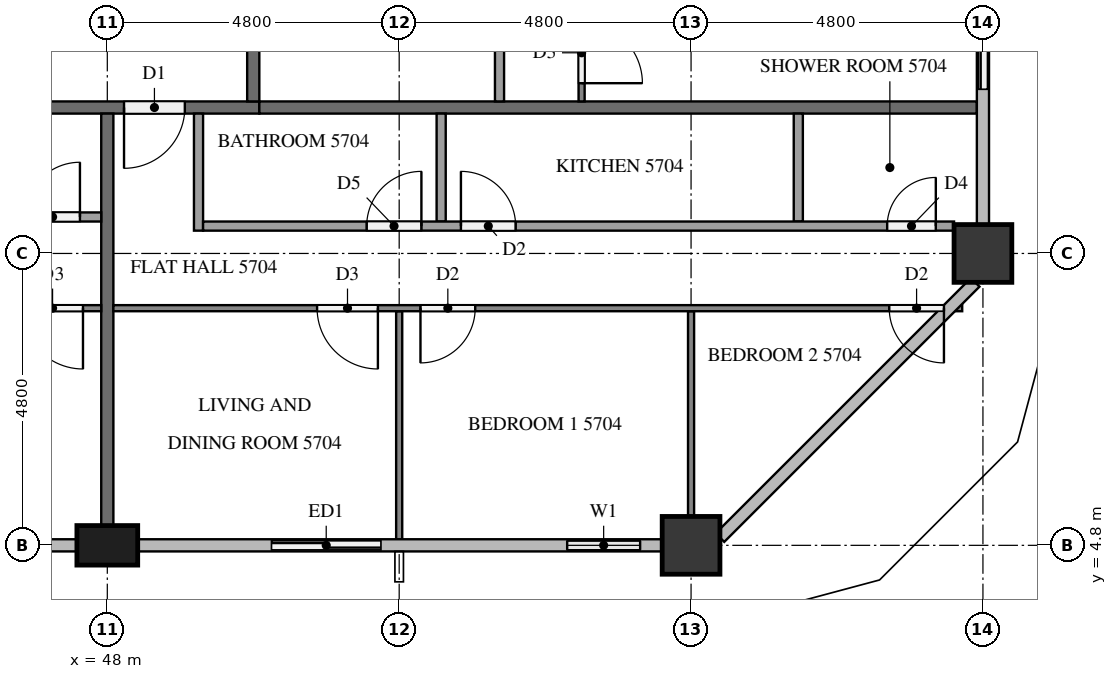
"""IFC4 building model, lengths in metres.
Left out: names, types, materials, properties, quantities, classifications, styles, units other than length and angle.
Written with IfcOpenShell. Run it as: python <this file> out.ifc"""

import sys

from ifc_helpers import new_model, si_unit, direction, frame, frame_2d, origin, origin_2d, place, context, subcontext, project, spatial, rectangle, extrude, element, fill, save


model = new_model("IFC4")
c1 = context("Model", 3, precision=1e-05, world=origin(), true_north=direction((0.0, 1.0)))
c2 = subcontext(c1, "Body", "Model", "MODEL_VIEW")
j1 = project(units=[si_unit("LENGTHUNIT", "METRE"), si_unit("PLANEANGLEUNIT", "RADIAN")], contexts=[c1])
p1 = place(None, origin())
s1 = spatial("IfcSite", under=j1, at=p1, CompositionType="ELEMENT")
p2 = place(p1, origin())
s2 = spatial("IfcBuilding", under=s1, at=p2, CompositionType="ELEMENT")
p3 = place(p2, frame((0.0, 0.0, 219.3)))
s3 = spatial("IfcBuildingStorey", under=s2, at=p3, CompositionType="ELEMENT", Elevation=219.3)
p4 = place(p3, frame((48.0, 4.8, 0.0), z_axis=(0.0, 0.0, 1.0), x_axis=(1.0, 0.0, 0.0)))
e1 = element("IfcColumn", 1, at=p4, inside=s3, PredefinedType="COLUMN", context=c2, shape_type="SweptSolid", body=[
    extrude(rectangle(XDim=1.0, YDim=0.65, at=origin_2d()), origin(), (0.0, 0.0, 1.0), 3.2),
])
for number, where, z_axis, x_axis in (
    (2, (57.6, 4.8, 0.0), (0.0, 0.0, 1.0), (1.0, 0.0, 0.0)),
    (3, (62.4, 9.6, 0.0), (0.0, 0.0, 1.0), (1.0, 0.0, 0.0)),
):
    element("IfcColumn", number, at=place(p3, frame(where, z_axis=z_axis, x_axis=x_axis)), inside=s3, PredefinedType="COLUMN", context=c2, shape_type="SweptSolid", body=[
        extrude(rectangle(XDim=0.95, YDim=0.95, at=origin_2d()), origin(), (0.0, 0.0, 1.0), 3.2),
    ])
p5 = place(p3, frame((50.4, 4.8, 0.0), z_axis=(0.0, 0.0, 1.0), x_axis=(1.0, 0.0, 0.0)))
e4 = element("IfcWall", 4, at=p5, inside=s3, PredefinedType="SOLIDWALL", context=c2, shape_type="SweptSolid", body=[
    extrude(rectangle(XDim=2.4, YDim=0.15, at=frame_2d((1.2, 0.0))), origin(), (0.0, 0.0, 1.0), 3.2),
])
p6 = place(p5, frame((0.3, 0.0, 0.0)))
e5 = element("IfcOpeningElement", 5, at=p6, cuts=e4, PredefinedType="OPENING", context=c2, shape_type="SweptSolid", body=[
    extrude(rectangle(XDim=1.8, YDim=2.4, at=frame_2d((0.9, 1.2))), frame((0.0, 0.085, 0.0), z_axis=(0.0, -1.0, 0.0), x_axis=(1.0, 0.0, 0.0)), (0.0, 0.0, 1.0), 0.17),
])
p7 = place(p3, frame((55.2, 4.8, 0.0), z_axis=(0.0, 0.0, 1.0), x_axis=(1.0, 0.0, 0.0)))
e6 = element("IfcWall", 6, at=p7, inside=s3, PredefinedType="SOLIDWALL", context=c2, shape_type="SweptSolid", body=[
    extrude(rectangle(XDim=1.925, YDim=0.15, at=frame_2d((0.962, 0.0))), origin(), (0.0, 0.0, 1.0), 3.2),
])
p8 = place(p7, frame((0.363, 0.0, 0.9)))
e7 = element("IfcOpeningElement", 7, at=p8, cuts=e6, PredefinedType="OPENING", context=c2, shape_type="SweptSolid", body=[
    extrude(rectangle(XDim=1.2, YDim=1.4, at=frame_2d((0.6, 0.7))), frame((0.0, 0.085, 0.0), z_axis=(0.0, -1.0, 0.0), x_axis=(1.0, 0.0, 0.0)), (0.0, 0.0, 1.0), 0.17),
])
p9 = place(p3, frame((62.4, 12.0, 0.0), z_axis=(0.0, 0.0, 1.0), x_axis=(0.0, 1.0, 0.0)))
e8 = element("IfcWall", 8, at=p9, inside=s3, PredefinedType="SOLIDWALL", context=c2, shape_type="SweptSolid", body=[
    extrude(rectangle(XDim=2.4, YDim=0.15, at=frame_2d((1.2, 0.0))), origin(), (0.0, 0.0, 1.0), 3.2),
])
p10 = place(p9, frame((0.3, 0.0, 0.0)))
e9 = element("IfcOpeningElement", 9, at=p10, cuts=e8, PredefinedType="OPENING", context=c2, shape_type="SweptSolid", body=[
    extrude(rectangle(XDim=1.8, YDim=2.4, at=frame_2d((0.9, 1.2))), frame((0.0, 0.085, 0.0), z_axis=(0.0, -1.0, 0.0), x_axis=(1.0, 0.0, 0.0)), (0.0, 0.0, 1.0), 0.17),
])
p11 = place(p3, frame((50.5, 12.0, 0.0), z_axis=(0.0, 0.0, 1.0), x_axis=(-1.0, 0.0, 0.0)))
e10 = element("IfcWall", 10, at=p11, inside=s3, PredefinedType="PARTITIONING", context=c2, shape_type="SweptSolid", body=[
    extrude(rectangle(XDim=38.6, YDim=0.2, at=frame_2d((19.3, 0.0))), origin(), (0.0, 0.0, 1.0), 3.2),
])
p12 = place(p11, frame((36.375, 0.0, 0.0)))
e11 = element("IfcOpeningElement", 11, at=p12, cuts=e10, PredefinedType="OPENING", context=c2, shape_type="SweptSolid", body=[
    extrude(rectangle(XDim=1.0, YDim=2.1, at=frame_2d((0.5, 1.05))), frame((0.0, 0.11, 0.0), z_axis=(0.0, -1.0, 0.0), x_axis=(1.0, 0.0, 0.0)), (0.0, 0.0, 1.0), 0.22),
])
p13 = place(p11, frame((34.825, 0.0, 0.0)))
e12 = element("IfcOpeningElement", 12, at=p13, cuts=e10, PredefinedType="OPENING", context=c2, shape_type="SweptSolid", body=[
    extrude(rectangle(XDim=1.0, YDim=2.1, at=frame_2d((0.5, 1.05))), frame((0.0, 0.11, 0.0), z_axis=(0.0, -1.0, 0.0), x_axis=(1.0, 0.0, 0.0)), (0.0, 0.0, 1.0), 0.22),
])
p14 = place(p11, frame((20.375, 0.0, 0.0)))
e13 = element("IfcOpeningElement", 13, at=p14, cuts=e10, PredefinedType="OPENING", context=c2, shape_type="SweptSolid", body=[
    extrude(rectangle(XDim=1.1, YDim=2.1, at=frame_2d((0.55, 1.05))), frame((0.0, 0.11, 0.0), z_axis=(0.0, -1.0, 0.0), x_axis=(1.0, 0.0, 0.0)), (0.0, 0.0, 1.0), 0.22),
])
p15 = place(p11, frame((1.225, 0.0, 0.0)))
e14 = element("IfcOpeningElement", 14, at=p15, cuts=e10, PredefinedType="OPENING", context=c2, shape_type="SweptSolid", body=[
    extrude(rectangle(XDim=1.0, YDim=2.1, at=frame_2d((0.5, 1.05))), frame((0.0, 0.11, 0.0), z_axis=(0.0, -1.0, 0.0), x_axis=(1.0, 0.0, 0.0)), (0.0, 0.0, 1.0), 0.22),
])
p16 = place(p3, frame((50.4, 40.7, 0.0), z_axis=(0.0, 0.0, 1.0), x_axis=(0.0, -1.0, 0.0)))
e15 = element("IfcWall", 15, at=p16, inside=s3, PredefinedType="PARTITIONING", context=c2, shape_type="SweptSolid", body=[
    extrude(rectangle(XDim=28.6, YDim=0.2, at=frame_2d((14.3, 0.0))), origin(), (0.0, 0.0, 1.0), 3.2),
])
p17 = place(p16, frame((21.775, 0.0, 0.0)))
e16 = element("IfcOpeningElement", 16, at=p17, cuts=e15, PredefinedType="OPENING", context=c2, shape_type="SweptSolid", body=[
    extrude(rectangle(XDim=1.0, YDim=2.1, at=frame_2d((0.5, 1.05))), frame((0.0, 0.11, 0.0), z_axis=(0.0, -1.0, 0.0), x_axis=(1.0, 0.0, 0.0)), (0.0, 0.0, 1.0), 0.22),
])
p18 = place(p16, frame((7.375, 0.0, 0.0)))
e17 = element("IfcOpeningElement", 17, at=p18, cuts=e15, PredefinedType="OPENING", context=c2, shape_type="SweptSolid", body=[
    extrude(rectangle(XDim=1.0, YDim=2.1, at=frame_2d((0.5, 1.05))), frame((0.0, 0.11, 0.0), z_axis=(0.0, -1.0, 0.0), x_axis=(1.0, 0.0, 0.0)), (0.0, 0.0, 1.0), 0.22),
])
p19 = place(p16, frame((0.175, 0.0, 0.0)))
e18 = element("IfcOpeningElement", 18, at=p19, cuts=e15, PredefinedType="OPENING", context=c2, shape_type="SweptSolid", body=[
    extrude(rectangle(XDim=1.0, YDim=2.1, at=frame_2d((0.5, 1.05))), frame((0.0, 0.11, 0.0), z_axis=(0.0, -1.0, 0.0), x_axis=(1.0, 0.0, 0.0)), (0.0, 0.0, 1.0), 0.22),
])
p20 = place(p3, frame((48.0, 11.9, 0.0), z_axis=(0.0, 0.0, 1.0), x_axis=(0.0, -1.0, 0.0)))
e19 = element("IfcWall", 19, at=p20, inside=s3, PredefinedType="PARTITIONING", context=c2, shape_type="SweptSolid", body=[
    extrude(rectangle(XDim=6.775, YDim=0.2, at=frame_2d((3.387, 0.0))), origin(), (0.0, 0.0, 1.0), 3.2),
])
p21 = place(p3, frame((50.5, 12.0, 0.0), z_axis=(0.0, 0.0, 1.0), x_axis=(1.0, 0.0, 0.0)))
e20 = element("IfcWall", 20, at=p21, inside=s3, PredefinedType="PARTITIONING", context=c2, shape_type="SweptSolid", body=[
    extrude(rectangle(XDim=11.8, YDim=0.2, at=frame_2d((5.9, 0.0))), origin(), (0.0, 0.0, 1.0), 3.2),
])
p22 = place(p3, frame((47.9, 8.7, 0.0), z_axis=(0.0, 0.0, 1.0), x_axis=(-1.0, 0.0, 0.0)))
e21 = element("IfcWall", 21, at=p22, inside=s3, PredefinedType="PARTITIONING", context=c2, shape_type="SweptSolid", body=[
    extrude(rectangle(XDim=19.0, YDim=0.1, at=frame_2d((9.5, 0.0))), origin(), (0.0, 0.0, 1.0), 3.2),
])
p23 = place(p22, frame((17.8, 0.0, 0.0)))
e22 = element("IfcOpeningElement", 22, at=p23, cuts=e21, PredefinedType="OPENING", context=c2, shape_type="SweptSolid", body=[
    extrude(rectangle(XDim=0.9, YDim=2.1, at=frame_2d((0.45, 1.05))), frame((0.0, 0.06, 0.0), z_axis=(0.0, -1.0, 0.0), x_axis=(1.0, 0.0, 0.0)), (0.0, 0.0, 1.0), 0.12),
])
p24 = place(p22, frame((9.85, 0.0, 0.0)))
e23 = element("IfcOpeningElement", 23, at=p24, cuts=e21, PredefinedType="OPENING", context=c2, shape_type="SweptSolid", body=[
    extrude(rectangle(XDim=0.9, YDim=2.1, at=frame_2d((0.45, 1.05))), frame((0.0, 0.06, 0.0), z_axis=(0.0, -1.0, 0.0), x_axis=(1.0, 0.0, 0.0)), (0.0, 0.0, 1.0), 0.12),
])
p25 = place(p22, frame((8.25, 0.0, 0.0)))
e24 = element("IfcOpeningElement", 24, at=p25, cuts=e21, PredefinedType="OPENING", context=c2, shape_type="SweptSolid", body=[
    extrude(rectangle(XDim=0.9, YDim=2.1, at=frame_2d((0.45, 1.05))), frame((0.0, 0.06, 0.0), z_axis=(0.0, -1.0, 0.0), x_axis=(1.0, 0.0, 0.0)), (0.0, 0.0, 1.0), 0.12),
])
p26 = place(p22, frame((0.3, 0.0, 0.0)))
e25 = element("IfcOpeningElement", 25, at=p26, cuts=e21, PredefinedType="OPENING", context=c2, shape_type="SweptSolid", body=[
    extrude(rectangle(XDim=1.0, YDim=2.1, at=frame_2d((0.5, 1.05))), frame((0.0, 0.06, 0.0), z_axis=(0.0, -1.0, 0.0), x_axis=(1.0, 0.0, 0.0)), (0.0, 0.0, 1.0), 0.12),
])
p27 = place(p3, frame((30.375, 10.2, 0.0), z_axis=(0.0, 0.0, 1.0), x_axis=(1.0, 0.0, 0.0)))
e26 = element("IfcWall", 26, at=p27, inside=s3, PredefinedType="PARTITIONING", context=c2, shape_type="SweptSolid", body=[
    extrude(rectangle(XDim=17.525, YDim=0.15, at=frame_2d((8.762, 0.0))), origin(), (0.0, 0.0, 1.0), 3.2),
])
p28 = place(p27, frame((0.3, 0.0, 0.0)))
e27 = element("IfcOpeningElement", 27, at=p28, cuts=e26, PredefinedType="OPENING", context=c2, shape_type="SweptSolid", body=[
    extrude(rectangle(XDim=0.9, YDim=2.1, at=frame_2d((0.45, 1.05))), frame((0.0, 0.085, 0.0), z_axis=(0.0, -1.0, 0.0), x_axis=(1.0, 0.0, 0.0)), (0.0, 0.0, 1.0), 0.17),
])
p29 = place(p27, frame((8.733, 0.0, 0.0)))
e28 = element("IfcOpeningElement", 28, at=p29, cuts=e26, PredefinedType="OPENING", context=c2, shape_type="SweptSolid", body=[
    extrude(rectangle(XDim=0.8, YDim=2.1, at=frame_2d((0.4, 1.05))), frame((0.0, 0.085, 0.0), z_axis=(0.0, -1.0, 0.0), x_axis=(1.0, 0.0, 0.0)), (0.0, 0.0, 1.0), 0.17),
])
p30 = place(p27, frame((10.183, 0.0, 0.0)))
e29 = element("IfcOpeningElement", 29, at=p30, cuts=e26, PredefinedType="OPENING", context=c2, shape_type="SweptSolid", body=[
    extrude(rectangle(XDim=0.8, YDim=2.1, at=frame_2d((0.4, 1.05))), frame((0.0, 0.085, 0.0), z_axis=(0.0, -1.0, 0.0), x_axis=(1.0, 0.0, 0.0)), (0.0, 0.0, 1.0), 0.17),
])
p31 = place(p27, frame((16.275, 0.0, 0.0)))
e30 = element("IfcOpeningElement", 30, at=p31, cuts=e26, PredefinedType="OPENING", context=c2, shape_type="SweptSolid", body=[
    extrude(rectangle(XDim=0.9, YDim=2.1, at=frame_2d((0.45, 1.05))), frame((0.0, 0.085, 0.0), z_axis=(0.0, -1.0, 0.0), x_axis=(1.0, 0.0, 0.0)), (0.0, 0.0, 1.0), 0.17),
])
p32 = place(p3, frame((52.8, 8.65, 0.0), z_axis=(0.0, 0.0, 1.0), x_axis=(0.0, -1.0, 0.0)))
e31 = element("IfcWall", 31, at=p32, inside=s3, PredefinedType="PARTITIONING", context=c2, shape_type="SweptSolid", body=[
    extrude(rectangle(XDim=3.75, YDim=0.1, at=frame_2d((1.875, 0.0))), origin(), (0.0, 0.0, 1.0), 3.2),
])
p33 = place(p3, frame((57.6, 8.65, 0.0), z_axis=(0.0, 0.0, 1.0), x_axis=(0.0, -1.0, 0.0)))
e32 = element("IfcWall", 32, at=p33, inside=s3, PredefinedType="PARTITIONING", context=c2, shape_type="SweptSolid", body=[
    extrude(rectangle(XDim=3.375, YDim=0.1, at=frame_2d((1.688, 0.0))), origin(), (0.0, 0.0, 1.0), 3.2),
])
p34 = place(p3, frame((62.059, 8.7, 0.0), z_axis=(0.0, 0.0, 1.0), x_axis=(-1.0, 0.0, 0.0)))
e33 = element("IfcWall", 33, at=p34, inside=s3, PredefinedType="PARTITIONING", context=c2, shape_type="SweptSolid", body=[
    extrude(rectangle(XDim=13.959, YDim=0.1, at=frame_2d((6.979, 0.0))), origin(), (0.0, 0.0, 1.0), 3.2),
])
p35 = place(p34, frame((9.609, 0.0, 0.0)))
e34 = element("IfcOpeningElement", 34, at=p35, cuts=e33, PredefinedType="OPENING", context=c2, shape_type="SweptSolid", body=[
    extrude(rectangle(XDim=1.0, YDim=2.1, at=frame_2d((0.5, 1.05))), frame((0.0, 0.06, 0.0), z_axis=(0.0, -1.0, 0.0), x_axis=(1.0, 0.0, 0.0)), (0.0, 0.0, 1.0), 0.12),
])
p36 = place(p34, frame((8.009, 0.0, 0.0)))
e35 = element("IfcOpeningElement", 35, at=p36, cuts=e33, PredefinedType="OPENING", context=c2, shape_type="SweptSolid", body=[
    extrude(rectangle(XDim=0.9, YDim=2.1, at=frame_2d((0.45, 1.05))), frame((0.0, 0.06, 0.0), z_axis=(0.0, -1.0, 0.0), x_axis=(1.0, 0.0, 0.0)), (0.0, 0.0, 1.0), 0.12),
])
p37 = place(p34, frame((0.3, 0.0, 0.0)))
e36 = element("IfcOpeningElement", 36, at=p37, cuts=e33, PredefinedType="OPENING", context=c2, shape_type="SweptSolid", body=[
    extrude(rectangle(XDim=0.9, YDim=2.1, at=frame_2d((0.45, 1.05))), frame((0.0, 0.06, 0.0), z_axis=(0.0, -1.0, 0.0), x_axis=(1.0, 0.0, 0.0)), (0.0, 0.0, 1.0), 0.12),
])
for number, where, z_axis, x_axis in (
    (37, (53.49, 11.9, 0.0), (0.0, 0.0, 1.0), (0.0, -1.0, 0.0)),
    (38, (59.364, 11.9, 0.0), (0.0, 0.0, 1.0), (0.0, -1.0, 0.0)),
):
    element("IfcWall", number, at=place(p3, frame(where, z_axis=z_axis, x_axis=x_axis)), inside=s3, PredefinedType="PARTITIONING", context=c2, shape_type="SweptSolid", body=[
        extrude(rectangle(XDim=1.775, YDim=0.15, at=frame_2d((0.887, 0.0))), origin(), (0.0, 0.0, 1.0), 3.2),
    ])
p38 = place(p3, frame((49.5, 11.9, 0.0), z_axis=(0.0, 0.0, 1.0), x_axis=(0.0, -1.0, 0.0)))
e39 = element("IfcWall", 39, at=p38, inside=s3, PredefinedType="PARTITIONING", context=c2, shape_type="SweptSolid", body=[
    extrude(rectangle(XDim=1.925, YDim=0.15, at=frame_2d((0.962, 0.0))), origin(), (0.0, 0.0, 1.0), 3.2),
])
p39 = place(p3, frame((49.575, 10.05, 0.0), z_axis=(0.0, 0.0, 1.0), x_axis=(1.0, 0.0, 0.0)))
e40 = element("IfcWall", 40, at=p39, inside=s3, PredefinedType="PARTITIONING", context=c2, shape_type="SweptSolid", body=[
    extrude(rectangle(XDim=12.35, YDim=0.15, at=frame_2d((6.175, 0.0))), origin(), (0.0, 0.0, 1.0), 3.2),
])
p40 = place(p39, frame((2.69, 0.0, 0.0)))
e41 = element("IfcOpeningElement", 41, at=p40, cuts=e40, PredefinedType="OPENING", context=c2, shape_type="SweptSolid", body=[
    extrude(rectangle(XDim=0.9, YDim=2.1, at=frame_2d((0.45, 1.05))), frame((0.0, 0.085, 0.0), z_axis=(0.0, -1.0, 0.0), x_axis=(1.0, 0.0, 0.0)), (0.0, 0.0, 1.0), 0.17),
])
p41 = place(p39, frame((4.24, 0.0, 0.0)))
e42 = element("IfcOpeningElement", 42, at=p41, cuts=e40, PredefinedType="OPENING", context=c2, shape_type="SweptSolid", body=[
    extrude(rectangle(XDim=0.9, YDim=2.1, at=frame_2d((0.45, 1.05))), frame((0.0, 0.085, 0.0), z_axis=(0.0, -1.0, 0.0), x_axis=(1.0, 0.0, 0.0)), (0.0, 0.0, 1.0), 0.17),
])
p42 = place(p39, frame((11.25, 0.0, 0.0)))
e43 = element("IfcOpeningElement", 43, at=p42, cuts=e40, PredefinedType="OPENING", context=c2, shape_type="SweptSolid", body=[
    extrude(rectangle(XDim=0.8, YDim=2.1, at=frame_2d((0.4, 1.05))), frame((0.0, 0.085, 0.0), z_axis=(0.0, -1.0, 0.0), x_axis=(1.0, 0.0, 0.0)), (0.0, 0.0, 1.0), 0.17),
])
p43 = place(p3, frame((55.8, 19.1, 0.0), z_axis=(0.0, 0.0, 1.0), x_axis=(0.0, -1.0, 0.0)))
e44 = element("IfcWall", 44, at=p43, inside=s3, PredefinedType="PARTITIONING", context=c2, shape_type="SweptSolid", body=[
    extrude(rectangle(XDim=7.0, YDim=0.1, at=frame_2d((3.5, 0.0))), origin(), (0.0, 0.0, 1.0), 3.2),
])
p44 = place(p43, frame((5.7, 0.0, 0.0)))
e45 = element("IfcOpeningElement", 45, at=p44, cuts=e44, PredefinedType="OPENING", context=c2, shape_type="SweptSolid", body=[
    extrude(rectangle(XDim=1.0, YDim=2.1, at=frame_2d((0.5, 1.05))), frame((0.0, 0.06, 0.0), z_axis=(0.0, -1.0, 0.0), x_axis=(1.0, 0.0, 0.0)), (0.0, 0.0, 1.0), 0.12),
])
p45 = place(p3, frame((54.45, 12.1, 0.0), z_axis=(0.0, 0.0, 1.0), x_axis=(0.0, 1.0, 0.0)))
e46 = element("IfcWall", 46, at=p45, inside=s3, PredefinedType="PARTITIONING", context=c2, shape_type="SweptSolid", body=[
    extrude(rectangle(XDim=5.525, YDim=0.15, at=frame_2d((2.762, 0.0))), origin(), (0.0, 0.0, 1.0), 3.2),
])
p46 = place(p45, frame((2.535, 0.0, 0.0)))
e47 = element("IfcOpeningElement", 47, at=p46, cuts=e46, PredefinedType="OPENING", context=c2, shape_type="SweptSolid", body=[
    extrude(rectangle(XDim=0.9, YDim=2.1, at=frame_2d((0.45, 1.05))), frame((0.0, 0.085, 0.0), z_axis=(0.0, -1.0, 0.0), x_axis=(1.0, 0.0, 0.0)), (0.0, 0.0, 1.0), 0.17),
])
p47 = place(p45, frame((1.085, 0.0, 0.0)))
e48 = element("IfcOpeningElement", 48, at=p47, cuts=e46, PredefinedType="OPENING", context=c2, shape_type="SweptSolid", body=[
    extrude(rectangle(XDim=0.8, YDim=2.1, at=frame_2d((0.4, 1.05))), frame((0.0, 0.085, 0.0), z_axis=(0.0, -1.0, 0.0), x_axis=(1.0, 0.0, 0.0)), (0.0, 0.0, 1.0), 0.17),
])
p48 = place(p6, origin())
e49 = element("IfcDoor", 49, at=p48, inside=s3, OperationType="SLIDING_TO_RIGHT", PredefinedType="DOOR", context=c2, shape_type="SweptSolid", body=[
    extrude(rectangle(XDim=1.8, YDim=2.4, at=frame_2d((0.9, 1.2))), frame((0.0, 0.025, 0.0), z_axis=(0.0, -1.0, 0.0), x_axis=(1.0, 0.0, 0.0)), (0.0, 0.0, 1.0), 0.05),
])
fill(e5, e49)
p49 = place(p8, origin())
e50 = element("IfcWindow", 50, at=p49, inside=s3, PartitioningType="SINGLE_PANEL", PredefinedType="WINDOW", context=c2, shape_type="SweptSolid", body=[
    extrude(rectangle(XDim=1.2, YDim=1.4, at=frame_2d((0.6, 0.7))), frame((0.0, 0.03, 0.0), z_axis=(0.0, -1.0, 0.0), x_axis=(1.0, 0.0, 0.0)), (0.0, 0.0, 1.0), 0.06),
])
fill(e7, e50)
p50 = place(p10, origin())
e51 = element("IfcDoor", 51, at=p50, inside=s3, OperationType="SLIDING_TO_LEFT", PredefinedType="DOOR", context=c2, shape_type="SweptSolid", body=[
    extrude(rectangle(XDim=1.8, YDim=2.4, at=frame_2d((0.9, 1.2))), frame((0.0, 0.025, 0.0), z_axis=(0.0, -1.0, 0.0), x_axis=(1.0, 0.0, 0.0)), (0.0, 0.0, 1.0), 0.05),
])
fill(e9, e51)
p51 = place(p15, origin())
e52 = element("IfcDoor", 52, at=p51, inside=s3, OperationType="SINGLE_SWING_RIGHT", PredefinedType="DOOR", context=c2, shape_type="SweptSolid", body=[
    extrude(rectangle(XDim=1.0, YDim=2.1, at=frame_2d((0.5, 1.05))), frame((0.0, 0.025, 0.0), z_axis=(0.0, -1.0, 0.0), x_axis=(1.0, 0.0, 0.0)), (0.0, 0.0, 1.0), 0.05),
])
fill(e14, e52)
p52 = place(p26, origin())
e53 = element("IfcDoor", 53, at=p52, inside=s3, OperationType="SINGLE_SWING_LEFT", PredefinedType="DOOR", context=c2, shape_type="SweptSolid", body=[
    extrude(rectangle(XDim=1.0, YDim=2.1, at=frame_2d((0.5, 1.05))), frame((0.0, 0.025, 0.0), z_axis=(0.0, -1.0, 0.0), x_axis=(1.0, 0.0, 0.0)), (0.0, 0.0, 1.0), 0.05),
])
fill(e25, e53)
p53 = place(p31, origin())
e54 = element("IfcDoor", 54, at=p53, inside=s3, OperationType="SINGLE_SWING_RIGHT", PredefinedType="DOOR", context=c2, shape_type="SweptSolid", body=[
    extrude(rectangle(XDim=0.9, YDim=2.1, at=frame_2d((0.45, 1.05))), frame((0.0, 0.025, 0.0), z_axis=(0.0, -1.0, 0.0), x_axis=(1.0, 0.0, 0.0)), (0.0, 0.0, 1.0), 0.05),
])
fill(e30, e54)
p54 = place(p35, origin())
e55 = element("IfcDoor", 55, at=p54, inside=s3, OperationType="SINGLE_SWING_LEFT", PredefinedType="DOOR", context=c2, shape_type="SweptSolid", body=[
    extrude(rectangle(XDim=1.0, YDim=2.1, at=frame_2d((0.5, 1.05))), frame((0.0, 0.025, 0.0), z_axis=(0.0, -1.0, 0.0), x_axis=(1.0, 0.0, 0.0)), (0.0, 0.0, 1.0), 0.05),
])
fill(e34, e55)
p55 = place(p36, origin())
e56 = element("IfcDoor", 56, at=p55, inside=s3, OperationType="SINGLE_SWING_RIGHT", PredefinedType="DOOR", context=c2, shape_type="SweptSolid", body=[
    extrude(rectangle(XDim=0.9, YDim=2.1, at=frame_2d((0.45, 1.05))), frame((0.0, 0.025, 0.0), z_axis=(0.0, -1.0, 0.0), x_axis=(1.0, 0.0, 0.0)), (0.0, 0.0, 1.0), 0.05),
])
fill(e35, e56)
p56 = place(p37, origin())
e57 = element("IfcDoor", 57, at=p56, inside=s3, OperationType="SINGLE_SWING_LEFT", PredefinedType="DOOR", context=c2, shape_type="SweptSolid", body=[
    extrude(rectangle(XDim=0.9, YDim=2.1, at=frame_2d((0.45, 1.05))), frame((0.0, 0.025, 0.0), z_axis=(0.0, -1.0, 0.0), x_axis=(1.0, 0.0, 0.0)), (0.0, 0.0, 1.0), 0.05),
])
fill(e36, e57)
p57 = place(p40, origin())
e58 = element("IfcDoor", 58, at=p57, inside=s3, OperationType="SINGLE_SWING_RIGHT", PredefinedType="DOOR", context=c2, shape_type="SweptSolid", body=[
    extrude(rectangle(XDim=0.9, YDim=2.1, at=frame_2d((0.45, 1.05))), frame((0.0, 0.025, 0.0), z_axis=(0.0, -1.0, 0.0), x_axis=(1.0, 0.0, 0.0)), (0.0, 0.0, 1.0), 0.05),
])
fill(e41, e58)
p58 = place(p41, origin())
e59 = element("IfcDoor", 59, at=p58, inside=s3, OperationType="SINGLE_SWING_LEFT", PredefinedType="DOOR", context=c2, shape_type="SweptSolid", body=[
    extrude(rectangle(XDim=0.9, YDim=2.1, at=frame_2d((0.45, 1.05))), frame((0.0, 0.025, 0.0), z_axis=(0.0, -1.0, 0.0), x_axis=(1.0, 0.0, 0.0)), (0.0, 0.0, 1.0), 0.05),
])
fill(e42, e59)
p59 = place(p42, origin())
e60 = element("IfcDoor", 60, at=p59, inside=s3, OperationType="SINGLE_SWING_RIGHT", PredefinedType="DOOR", context=c2, shape_type="SweptSolid", body=[
    extrude(rectangle(XDim=0.8, YDim=2.1, at=frame_2d((0.4, 1.05))), frame((0.0, 0.025, 0.0), z_axis=(0.0, -1.0, 0.0), x_axis=(1.0, 0.0, 0.0)), (0.0, 0.0, 1.0), 0.05),
])
fill(e43, e60)
p60 = place(p44, origin())
e61 = element("IfcDoor", 61, at=p60, inside=s3, OperationType="SINGLE_SWING_RIGHT", PredefinedType="DOOR", context=c2, shape_type="SweptSolid", body=[
    extrude(rectangle(XDim=1.0, YDim=2.1, at=frame_2d((0.5, 1.05))), frame((0.0, 0.025, 0.0), z_axis=(0.0, -1.0, 0.0), x_axis=(1.0, 0.0, 0.0)), (0.0, 0.0, 1.0), 0.05),
])
fill(e45, e61)
save(model, sys.argv[1])
